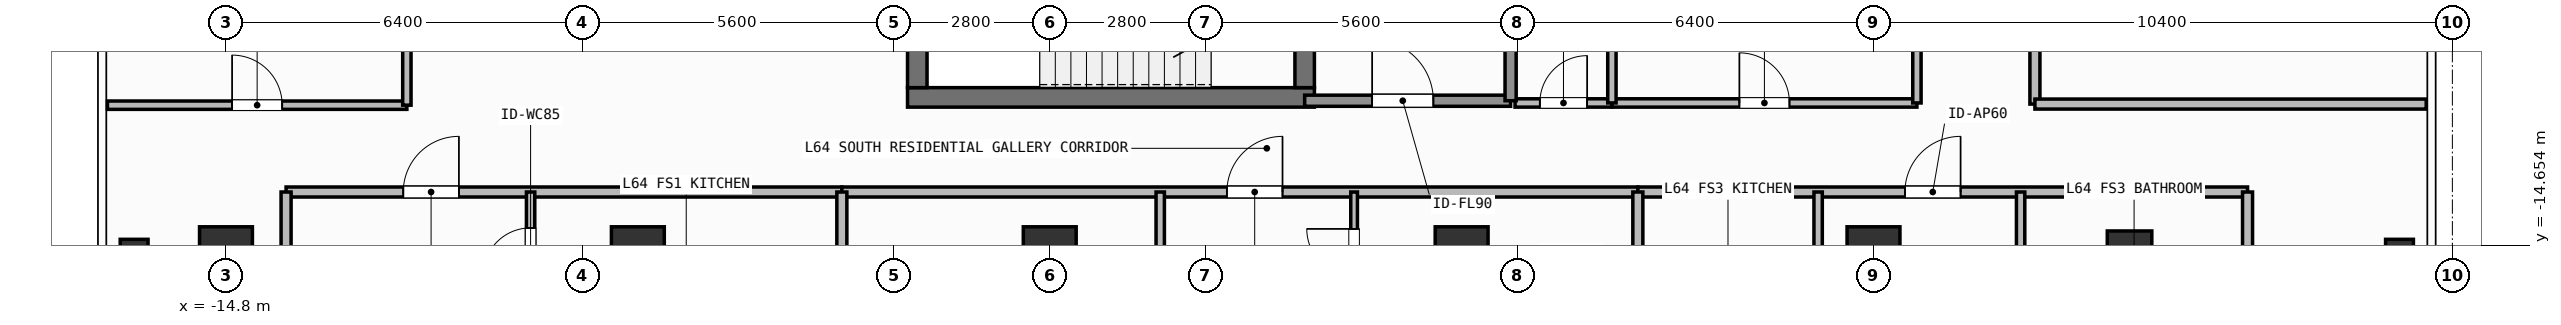
"""IFC4 building model, lengths in metres.
Left out: names, types, materials, properties, quantities, classifications, styles, units other than length and angle.
Written with IfcOpenShell. Run it as: python <this file> out.ifc"""

import sys

from ifc_helpers import new_model, si_unit, direction, frame, frame_2d, origin, origin_2d, place, context, subcontext, project, spatial, rectangle, hollow_rectangle, extrude, element, fill, save


model = new_model("IFC4")
c1 = context("Model", 3, precision=1e-05, world=origin(), true_north=direction((0.0, 1.0)))
c2 = subcontext(c1, "Body", "Model", "MODEL_VIEW")
j1 = project(units=[si_unit("LENGTHUNIT", "METRE"), si_unit("PLANEANGLEUNIT", "RADIAN")], contexts=[c1])
p1 = place(None, origin())
s1 = spatial("IfcSite", under=j1, at=p1, CompositionType="ELEMENT")
p2 = place(p1, origin())
s2 = spatial("IfcBuilding", under=s1, at=p2, CompositionType="ELEMENT")
p3 = place(p2, frame((0.0, 0.0, 262.5)))
s3 = spatial("IfcBuildingStorey", under=s2, at=p3, CompositionType="ELEMENT", Elevation=262.5)
p4 = place(p3, frame((-2.555, -12.0, 0.0), z_axis=(0.0, 0.0, 1.0), x_axis=(1.0, 0.0, 0.0)))
e1 = element("IfcWall", 1, at=p4, inside=s3, PredefinedType="SHEAR", context=c2, shape_type="SweptSolid", body=[
    extrude(rectangle(XDim=7.31, YDim=0.35, at=frame_2d((3.655, 0.0))), origin(), (0.0, 0.0, 1.0), 3.9),
])
p5 = place(p3, frame((-2.38, -11.825, 0.0), z_axis=(0.0, 0.0, 1.0), x_axis=(0.0, 1.0, 0.0)))
e2 = element("IfcWall", 2, at=p5, inside=s3, PredefinedType="SHEAR", context=c2, shape_type="SweptSolid", body=[
    extrude(rectangle(XDim=2.925, YDim=0.35, at=frame_2d((1.462, 0.0))), origin(), (0.0, 0.0, 1.0), 3.9),
])
p6 = place(p3, frame((4.58, -8.9, 0.0), z_axis=(0.0, 0.0, 1.0), x_axis=(0.0, -1.0, 0.0)))
e3 = element("IfcWall", 3, at=p6, inside=s3, PredefinedType="SHEAR", context=c2, shape_type="SweptSolid", body=[
    extrude(rectangle(XDim=2.925, YDim=0.35, at=frame_2d((1.462, 0.0))), origin(), (0.0, 0.0, 1.0), 3.9),
])
p7 = place(p6, frame((0.913, 0.0, 0.0)))
e4 = element("IfcOpeningElement", 4, at=p7, cuts=e3, PredefinedType="OPENING", context=c2, shape_type="SweptSolid", body=[
    extrude(rectangle(XDim=1.1, YDim=2.15, at=frame_2d((0.55, 1.075))), frame((0.0, 0.185, 0.0), z_axis=(0.0, -1.0, 0.0), x_axis=(1.0, 0.0, 0.0)), (0.0, 0.0, 1.0), 0.37),
])
for number, where, z_axis, x_axis in (
    (5, (-14.8, -14.8, 0.0), (0.0, 0.0, 1.0), (1.0, 0.0, 0.0)),
    (6, (-7.4, -14.8, 0.0), (0.0, 0.0, 1.0), (1.0, 0.0, 0.0)),
    (7, (0.0, -14.8, 0.0), (0.0, 0.0, 1.0), (1.0, 0.0, 0.0)),
    (8, (7.4, -14.8, 0.0), (0.0, 0.0, 1.0), (1.0, 0.0, 0.0)),
    (9, (14.8, -14.8, 0.0), (0.0, 0.0, 1.0), (1.0, 0.0, 0.0)),
):
    element("IfcColumn", number, at=place(p3, frame(where, z_axis=z_axis, x_axis=x_axis)), inside=s3, PredefinedType="COLUMN", context=c2, shape_type="SweptSolid", body=[
        extrude(rectangle(XDim=0.95, YDim=0.95, at=origin_2d()), origin(), (0.0, 0.0, 1.0), 3.9),
    ])
p8 = place(p3, frame((19.4, -14.8, 0.0), z_axis=(0.0, 0.0, 1.0), x_axis=(1.0, 0.0, 0.0)))
e10 = element("IfcColumn", 10, at=p8, inside=s3, PredefinedType="COLUMN", context=c2, shape_type="SweptSolid", body=[
    extrude(hollow_rectangle(XDim=0.8, YDim=0.8, WallThickness=0.036, at=origin_2d()), origin(), (0.0, 0.0, 1.0), 3.9),
])
for number, where, z_axis, x_axis in (
    (11, (-16.45, -14.8, 0.0), (0.0, 0.0, 1.0), (1.0, 0.0, 0.0)),
    (12, (24.25, -14.8, 0.0), (0.0, 0.0, 1.0), (1.0, 0.0, 0.0)),
):
    element("IfcColumn", number, at=place(p3, frame(where, z_axis=z_axis, x_axis=x_axis)), inside=s3, PredefinedType="COLUMN", context=c2, shape_type="SweptSolid", body=[
        extrude(hollow_rectangle(XDim=0.5, YDim=0.5, WallThickness=0.025, at=origin_2d()), origin(), (0.0, 0.0, 1.0), 3.9),
    ])
p9 = place(p3, frame((4.58, -12.06, 0.0), z_axis=(0.0, 0.0, 1.0), x_axis=(1.0, 0.0, 0.0)))
e13 = element("IfcWall", 13, at=p9, inside=s3, PredefinedType="SOLIDWALL", context=c2, shape_type="SweptSolid", body=[
    extrude(rectangle(XDim=3.7, YDim=0.2, at=frame_2d((1.85, 0.0))), origin(), (0.0, 0.0, 1.0), 3.68),
])
p10 = place(p9, frame((1.212, 0.0, 0.0)))
e14 = element("IfcOpeningElement", 14, at=p10, cuts=e13, PredefinedType="OPENING", context=c2, shape_type="SweptSolid", body=[
    extrude(rectangle(XDim=1.1, YDim=2.15, at=frame_2d((0.55, 1.075))), frame((0.0, 0.11, 0.0), z_axis=(0.0, -1.0, 0.0), x_axis=(1.0, 0.0, 0.0)), (0.0, 0.0, 1.0), 0.22),
])
p11 = place(p3, frame((8.36, -12.1, 0.0), z_axis=(0.0, 0.0, 1.0), x_axis=(1.0, 0.0, 0.0)))
e15 = element("IfcWall", 15, at=p11, inside=s3, PredefinedType="PARTITIONING", context=c2, shape_type="SweptSolid", body=[
    extrude(rectangle(XDim=1.74, YDim=0.15, at=frame_2d((0.87, 0.0))), origin(), (0.0, 0.0, 1.0), 3.68),
])
p12 = place(p11, frame((0.445, 0.0, 0.0)))
e16 = element("IfcOpeningElement", 16, at=p12, cuts=e15, PredefinedType="OPENING", context=c2, shape_type="SweptSolid", body=[
    extrude(rectangle(XDim=0.85, YDim=2.1, at=frame_2d((0.425, 1.05))), frame((0.0, 0.085, 0.0), z_axis=(0.0, -1.0, 0.0), x_axis=(1.0, 0.0, 0.0)), (0.0, 0.0, 1.0), 0.17),
])
p13 = place(p3, frame((10.1, -12.1, 0.0), z_axis=(0.0, 0.0, 1.0), x_axis=(1.0, 0.0, 0.0)))
e17 = element("IfcWall", 17, at=p13, inside=s3, PredefinedType="PARTITIONING", context=c2, shape_type="SweptSolid", body=[
    extrude(rectangle(XDim=5.48, YDim=0.15, at=frame_2d((2.74, 0.0))), origin(), (0.0, 0.0, 1.0), 3.68),
])
p14 = place(p13, frame((2.29, 0.0, 0.0)))
e18 = element("IfcOpeningElement", 18, at=p14, cuts=e17, PredefinedType="OPENING", context=c2, shape_type="SweptSolid", body=[
    extrude(rectangle(XDim=0.9, YDim=2.1, at=frame_2d((0.45, 1.05))), frame((0.0, 0.085, 0.0), z_axis=(0.0, -1.0, 0.0), x_axis=(1.0, 0.0, 0.0)), (0.0, 0.0, 1.0), 0.17),
])
p15 = place(p3, frame((-13.72, -13.7, 0.0), z_axis=(0.0, 0.0, 1.0), x_axis=(1.0, 0.0, 0.0)))
e19 = element("IfcWall", 19, at=p15, inside=s3, PredefinedType="PARTITIONING", context=c2, shape_type="SweptSolid", body=[
    extrude(rectangle(XDim=9.985, YDim=0.18, at=frame_2d((4.992, 0.0))), origin(), (0.0, 0.0, 1.0), 3.68),
])
p16 = place(p15, frame((2.105, 0.0, 0.0)))
e20 = element("IfcOpeningElement", 20, at=p16, cuts=e19, PredefinedType="OPENING", context=c2, shape_type="SweptSolid", body=[
    extrude(rectangle(XDim=1.0, YDim=2.2, at=frame_2d((0.5, 1.1))), frame((0.0, 0.1, 0.0), z_axis=(0.0, -1.0, 0.0), x_axis=(1.0, 0.0, 0.0)), (0.0, 0.0, 1.0), 0.2),
])
p17 = place(p3, frame((-9.327, -15.839, 0.0), z_axis=(0.0, 0.0, 1.0), x_axis=(0.0, 1.0, 0.0)))
e21 = element("IfcWall", 21, at=p17, inside=s3, PredefinedType="PARTITIONING", context=c2, shape_type="SweptSolid", body=[
    extrude(rectangle(XDim=2.139, YDim=0.15, at=frame_2d((1.07, 0.0))), origin(), (0.0, 0.0, 1.0), 3.68),
])
p18 = place(p17, frame((0.645, 0.0, 0.0)))
e22 = element("IfcOpeningElement", 22, at=p18, cuts=e21, PredefinedType="OPENING", context=c2, shape_type="SweptSolid", body=[
    extrude(rectangle(XDim=0.85, YDim=2.1, at=frame_2d((0.425, 1.05))), frame((0.0, 0.085, 0.0), z_axis=(0.0, -1.0, 0.0), x_axis=(1.0, 0.0, 0.0)), (0.0, 0.0, 1.0), 0.17),
])
p19 = place(p3, frame((-3.735, -13.7, 0.0), z_axis=(0.0, 0.0, 1.0), x_axis=(1.0, 0.0, 0.0)))
e23 = element("IfcWall", 23, at=p19, inside=s3, PredefinedType="PARTITIONING", context=c2, shape_type="SweptSolid", body=[
    extrude(rectangle(XDim=14.301, YDim=0.18, at=frame_2d((7.15, 0.0))), origin(), (0.0, 0.0, 1.0), 3.68),
])
p20 = place(p19, frame((6.917, 0.0, 0.0)))
e24 = element("IfcOpeningElement", 24, at=p20, cuts=e23, PredefinedType="OPENING", context=c2, shape_type="SweptSolid", body=[
    extrude(rectangle(XDim=1.0, YDim=2.2, at=frame_2d((0.5, 1.1))), frame((0.0, 0.1, 0.0), z_axis=(0.0, -1.0, 0.0), x_axis=(1.0, 0.0, 0.0)), (0.0, 0.0, 1.0), 0.2),
])
p21 = place(p3, frame((1.985, -17.524, 0.0), z_axis=(0.0, 0.0, 1.0), x_axis=(0.0, 1.0, 0.0)))
e25 = element("IfcWall", 25, at=p21, inside=s3, PredefinedType="PARTITIONING", context=c2, shape_type="SweptSolid", body=[
    extrude(rectangle(XDim=3.824, YDim=0.15, at=frame_2d((1.912, 0.0))), origin(), (0.0, 0.0, 1.0), 3.68),
])
p22 = place(p21, frame((1.398, 0.0, 0.0)))
e26 = element("IfcOpeningElement", 26, at=p22, cuts=e25, PredefinedType="OPENING", context=c2, shape_type="SweptSolid", body=[
    extrude(rectangle(XDim=0.85, YDim=2.1, at=frame_2d((0.425, 1.05))), frame((0.0, 0.085, 0.0), z_axis=(0.0, -1.0, 0.0), x_axis=(1.0, 0.0, 0.0)), (0.0, 0.0, 1.0), 0.17),
])
p23 = place(p3, frame((5.468, -15.876, 0.0), z_axis=(0.0, 0.0, 1.0), x_axis=(0.0, 1.0, 0.0)))
e27 = element("IfcWall", 27, at=p23, inside=s3, PredefinedType="PARTITIONING", context=c2, shape_type="SweptSolid", body=[
    extrude(rectangle(XDim=2.176, YDim=0.12, at=frame_2d((1.088, 0.0))), origin(), (0.0, 0.0, 1.0), 3.68),
])
p24 = place(p23, frame((0.663, 0.0, 0.0)))
e28 = element("IfcOpeningElement", 28, at=p24, cuts=e27, PredefinedType="OPENING", context=c2, shape_type="SweptSolid", body=[
    extrude(rectangle(XDim=0.85, YDim=2.1, at=frame_2d((0.425, 1.05))), frame((0.0, 0.07, 0.0), z_axis=(0.0, -1.0, 0.0), x_axis=(1.0, 0.0, 0.0)), (0.0, 0.0, 1.0), 0.14),
])
p25 = place(p3, frame((10.566, -13.7, 0.0), z_axis=(0.0, 0.0, 1.0), x_axis=(1.0, 0.0, 0.0)))
e29 = element("IfcWall", 29, at=p25, inside=s3, PredefinedType="PARTITIONING", context=c2, shape_type="SweptSolid", body=[
    extrude(rectangle(XDim=10.954, YDim=0.18, at=frame_2d((5.477, 0.0))), origin(), (0.0, 0.0, 1.0), 3.68),
])
p26 = place(p25, frame((4.799, 0.0, 0.0)))
e30 = element("IfcOpeningElement", 30, at=p26, cuts=e29, PredefinedType="OPENING", context=c2, shape_type="SweptSolid", body=[
    extrude(rectangle(XDim=1.0, YDim=2.2, at=frame_2d((0.5, 1.1))), frame((0.0, 0.1, 0.0), z_axis=(0.0, -1.0, 0.0), x_axis=(1.0, 0.0, 0.0)), (0.0, 0.0, 1.0), 0.2),
])
p27 = place(p3, frame((13.805, -17.219, 0.0), z_axis=(0.0, 0.0, 1.0), x_axis=(0.0, 1.0, 0.0)))
e31 = element("IfcWall", 31, at=p27, inside=s3, PredefinedType="PARTITIONING", context=c2, shape_type="SweptSolid", body=[
    extrude(rectangle(XDim=3.519, YDim=0.15, at=frame_2d((1.76, 0.0))), origin(), (0.0, 0.0, 1.0), 3.68),
])
p28 = place(p27, frame((0.999, 0.0, 0.0)))
e32 = element("IfcOpeningElement", 32, at=p28, cuts=e31, PredefinedType="OPENING", context=c2, shape_type="SweptSolid", body=[
    extrude(rectangle(XDim=0.85, YDim=2.1, at=frame_2d((0.425, 1.05))), frame((0.0, 0.085, 0.0), z_axis=(0.0, -1.0, 0.0), x_axis=(1.0, 0.0, 0.0)), (0.0, 0.0, 1.0), 0.17),
])
p29 = place(p3, frame((17.443, -17.219, 0.0), z_axis=(0.0, 0.0, 1.0), x_axis=(0.0, 1.0, 0.0)))
e33 = element("IfcWall", 33, at=p29, inside=s3, PredefinedType="PARTITIONING", context=c2, shape_type="SweptSolid", body=[
    extrude(rectangle(XDim=3.519, YDim=0.15, at=frame_2d((1.76, 0.0))), origin(), (0.0, 0.0, 1.0), 3.68),
])
p30 = place(p29, frame((1.334, 0.0, 0.0)))
e34 = element("IfcOpeningElement", 34, at=p30, cuts=e33, PredefinedType="OPENING", context=c2, shape_type="SweptSolid", body=[
    extrude(rectangle(XDim=0.85, YDim=2.1, at=frame_2d((0.425, 1.05))), frame((0.0, 0.085, 0.0), z_axis=(0.0, -1.0, 0.0), x_axis=(1.0, 0.0, 0.0)), (0.0, 0.0, 1.0), 0.17),
])
p31 = place(p3, frame((-16.93, -12.14, 0.0), z_axis=(0.0, 0.0, 1.0), x_axis=(1.0, 0.0, 0.0)))
e35 = element("IfcWall", 35, at=p31, inside=s3, PredefinedType="PARTITIONING", context=c2, shape_type="SweptSolid", body=[
    extrude(rectangle(XDim=5.38, YDim=0.15, at=frame_2d((2.69, 0.0))), origin(), (0.0, 0.0, 1.0), 3.68),
])
p32 = place(p31, frame((2.24, 0.0, 0.0)))
e36 = element("IfcOpeningElement", 36, at=p32, cuts=e35, PredefinedType="OPENING", context=c2, shape_type="SweptSolid", body=[
    extrude(rectangle(XDim=0.9, YDim=2.1, at=frame_2d((0.45, 1.05))), frame((0.0, 0.085, 0.0), z_axis=(0.0, -1.0, 0.0), x_axis=(1.0, 0.0, 0.0)), (0.0, 0.0, 1.0), 0.17),
])
p33 = place(p3, frame((17.7, -12.12, 0.0), z_axis=(0.0, 0.0, 1.0), x_axis=(0.0, 1.0, 0.0)))
e37 = element("IfcWall", 37, at=p33, inside=s3, PredefinedType="PARTITIONING", context=c2, shape_type="SweptSolid", body=[
    extrude(rectangle(XDim=7.353, YDim=0.18, at=frame_2d((3.677, 0.0))), origin(), (0.0, 0.0, 1.0), 3.68),
])
p34 = place(p33, frame((1.225, 0.0, 0.0)))
e38 = element("IfcOpeningElement", 38, at=p34, cuts=e37, PredefinedType="OPENING", context=c2, shape_type="SweptSolid", body=[
    extrude(rectangle(XDim=1.0, YDim=2.2, at=frame_2d((0.5, 1.1))), frame((0.0, 0.1, 0.0), z_axis=(0.0, -1.0, 0.0), x_axis=(1.0, 0.0, 0.0)), (0.0, 0.0, 1.0), 0.2),
])
p35 = place(p3, frame((8.28, -12.06, 0.0), z_axis=(0.0, 0.0, 1.0), x_axis=(0.0, 1.0, 0.0)))
e39 = element("IfcWall", 39, at=p35, inside=s3, PredefinedType="SOLIDWALL", context=c2, shape_type="SweptSolid", body=[
    extrude(rectangle(XDim=3.335, YDim=0.2, at=frame_2d((1.667, 0.0))), origin(), (0.0, 0.0, 1.0), 3.68),
])
p36 = place(p3, frame((10.1, -12.1, 0.0), z_axis=(0.0, 0.0, 1.0), x_axis=(0.0, 1.0, 0.0)))
e40 = element("IfcWall", 40, at=p36, inside=s3, PredefinedType="PARTITIONING", context=c2, shape_type="SweptSolid", body=[
    extrude(rectangle(XDim=2.35, YDim=0.15, at=frame_2d((1.175, 0.0))), origin(), (0.0, 0.0, 1.0), 3.68),
])
p37 = place(p3, frame((15.58, -12.1, 0.0), z_axis=(0.0, 0.0, 1.0), x_axis=(0.0, 1.0, 0.0)))
e41 = element("IfcWall", 41, at=p37, inside=s3, PredefinedType="PARTITIONING", context=c2, shape_type="SweptSolid", body=[
    extrude(rectangle(XDim=6.25, YDim=0.15, at=frame_2d((3.125, 0.0))), origin(), (0.0, 0.0, 1.0), 3.68),
])
for number, where, z_axis, x_axis in (
    (42, (-13.72, -19.51, 0.0), (0.0, 0.0, 1.0), (0.0, 1.0, 0.0)),
    (43, (21.52, -19.51, 0.0), (0.0, 0.0, 1.0), (0.0, 1.0, 0.0)),
):
    element("IfcWall", number, at=place(p3, frame(where, z_axis=z_axis, x_axis=x_axis)), inside=s3, PredefinedType="PARTITIONING", context=c2, shape_type="SweptSolid", body=[
        extrude(rectangle(XDim=5.81, YDim=0.18, at=frame_2d((2.905, 0.0))), origin(), (0.0, 0.0, 1.0), 3.68),
    ])
for number, where, z_axis, x_axis in (
    (44, (-3.735, -20.63, 0.0), (0.0, 0.0, 1.0), (0.0, 1.0, 0.0)),
    (45, (10.566, -20.63, 0.0), (0.0, 0.0, 1.0), (0.0, 1.0, 0.0)),
):
    element("IfcWall", number, at=place(p3, frame(where, z_axis=z_axis, x_axis=x_axis)), inside=s3, PredefinedType="PARTITIONING", context=c2, shape_type="SweptSolid", body=[
        extrude(rectangle(XDim=6.93, YDim=0.18, at=frame_2d((3.465, 0.0))), origin(), (0.0, 0.0, 1.0), 3.68),
    ])
p38 = place(p3, frame((-11.55, -12.14, 0.0), z_axis=(0.0, 0.0, 1.0), x_axis=(0.0, 1.0, 0.0)))
e46 = element("IfcWall", 46, at=p38, inside=s3, PredefinedType="PARTITIONING", context=c2, shape_type="SweptSolid", body=[
    extrude(rectangle(XDim=15.09, YDim=0.15, at=frame_2d((7.545, 0.0))), origin(), (0.0, 0.0, 1.0), 3.68),
])
p39 = place(p3, frame((17.7, -12.12, 0.0), z_axis=(0.0, 0.0, 1.0), x_axis=(1.0, 0.0, 0.0)))
e47 = element("IfcWall", 47, at=p39, inside=s3, PredefinedType="PARTITIONING", context=c2, shape_type="SweptSolid", body=[
    extrude(rectangle(XDim=7.03, YDim=0.18, at=frame_2d((3.515, 0.0))), origin(), (0.0, 0.0, 1.0), 3.68),
])
p40 = place(p10, origin())
e48 = element("IfcDoor", 48, at=p40, inside=s3, OperationType="SINGLE_SWING_LEFT", PredefinedType="DOOR", context=c2, shape_type="SweptSolid", body=[
    extrude(rectangle(XDim=1.1, YDim=2.15, at=frame_2d((0.55, 1.075))), frame((0.0, 0.025, 0.0), z_axis=(0.0, -1.0, 0.0), x_axis=(1.0, 0.0, 0.0)), (0.0, 0.0, 1.0), 0.05),
])
fill(e14, e48)
p41 = place(p12, origin())
e49 = element("IfcDoor", 49, at=p41, inside=s3, OperationType="SINGLE_SWING_RIGHT", PredefinedType="DOOR", context=c2, shape_type="SweptSolid", body=[
    extrude(rectangle(XDim=0.85, YDim=2.1, at=frame_2d((0.425, 1.05))), frame((0.0, 0.025, 0.0), z_axis=(0.0, -1.0, 0.0), x_axis=(1.0, 0.0, 0.0)), (0.0, 0.0, 1.0), 0.05),
])
fill(e16, e49)
p42 = place(p14, origin())
e50 = element("IfcDoor", 50, at=p42, inside=s3, OperationType="SINGLE_SWING_LEFT", PredefinedType="DOOR", context=c2, shape_type="SweptSolid", body=[
    extrude(rectangle(XDim=0.9, YDim=2.1, at=frame_2d((0.45, 1.05))), frame((0.0, 0.025, 0.0), z_axis=(0.0, -1.0, 0.0), x_axis=(1.0, 0.0, 0.0)), (0.0, 0.0, 1.0), 0.05),
])
fill(e18, e50)
p43 = place(p16, origin())
e51 = element("IfcDoor", 51, at=p43, inside=s3, OperationType="SINGLE_SWING_RIGHT", PredefinedType="DOOR", context=c2, shape_type="SweptSolid", body=[
    extrude(rectangle(XDim=1.0, YDim=2.2, at=frame_2d((0.5, 1.1))), frame((0.0, 0.025, 0.0), z_axis=(0.0, -1.0, 0.0), x_axis=(1.0, 0.0, 0.0)), (0.0, 0.0, 1.0), 0.05),
])
fill(e20, e51)
p44 = place(p18, origin())
e52 = element("IfcDoor", 52, at=p44, inside=s3, OperationType="SINGLE_SWING_LEFT", PredefinedType="DOOR", context=c2, shape_type="SweptSolid", body=[
    extrude(rectangle(XDim=0.85, YDim=2.1, at=frame_2d((0.425, 1.05))), frame((0.0, 0.025, 0.0), z_axis=(0.0, -1.0, 0.0), x_axis=(1.0, 0.0, 0.0)), (0.0, 0.0, 1.0), 0.05),
])
fill(e22, e52)
p45 = place(p20, origin())
e53 = element("IfcDoor", 53, at=p45, inside=s3, OperationType="SINGLE_SWING_RIGHT", PredefinedType="DOOR", context=c2, shape_type="SweptSolid", body=[
    extrude(rectangle(XDim=1.0, YDim=2.2, at=frame_2d((0.5, 1.1))), frame((0.0, 0.025, 0.0), z_axis=(0.0, -1.0, 0.0), x_axis=(1.0, 0.0, 0.0)), (0.0, 0.0, 1.0), 0.05),
])
fill(e24, e53)
p46 = place(p24, origin())
e54 = element("IfcDoor", 54, at=p46, inside=s3, OperationType="SINGLE_SWING_RIGHT", PredefinedType="DOOR", context=c2, shape_type="SweptSolid", body=[
    extrude(rectangle(XDim=0.85, YDim=2.1, at=frame_2d((0.425, 1.05))), frame((0.0, 0.025, 0.0), z_axis=(0.0, -1.0, 0.0), x_axis=(1.0, 0.0, 0.0)), (0.0, 0.0, 1.0), 0.05),
])
fill(e28, e54)
p47 = place(p26, origin())
e55 = element("IfcDoor", 55, at=p47, inside=s3, OperationType="SINGLE_SWING_RIGHT", PredefinedType="DOOR", context=c2, shape_type="SweptSolid", body=[
    extrude(rectangle(XDim=1.0, YDim=2.2, at=frame_2d((0.5, 1.1))), frame((0.0, 0.025, 0.0), z_axis=(0.0, -1.0, 0.0), x_axis=(1.0, 0.0, 0.0)), (0.0, 0.0, 1.0), 0.05),
])
fill(e30, e55)
p48 = place(p32, origin())
e56 = element("IfcDoor", 56, at=p48, inside=s3, OperationType="SINGLE_SWING_LEFT", PredefinedType="DOOR", context=c2, shape_type="SweptSolid", body=[
    extrude(rectangle(XDim=0.9, YDim=2.1, at=frame_2d((0.45, 1.05))), frame((0.0, 0.025, 0.0), z_axis=(0.0, -1.0, 0.0), x_axis=(1.0, 0.0, 0.0)), (0.0, 0.0, 1.0), 0.05),
])
fill(e36, e56)
save(model, sys.argv[1])
